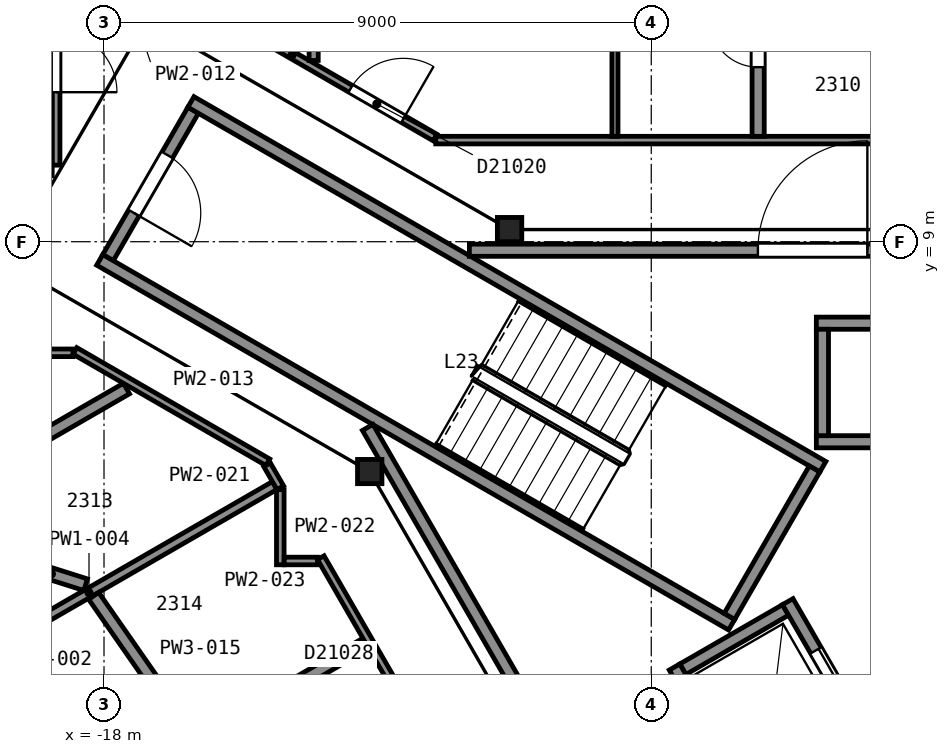
"""IFC4 building model, lengths in metres.
Left out: names, types, materials, properties, quantities, classifications, styles, units other than length and angle.
Written with IfcOpenShell. Run it as: python <this file> out.ifc"""

import sys

from ifc_helpers import new_model, si_unit, direction, frame, frame_2d, origin, origin_2d, place, context, subcontext, project, spatial, rectangle, i_section, extrude, element, fill, save


model = new_model("IFC4")
c1 = context("Model", 3, precision=1e-05, world=origin(), true_north=direction((0.0, 1.0)))
c2 = subcontext(c1, "Body", "Model", "MODEL_VIEW")
j1 = project(units=[si_unit("LENGTHUNIT", "METRE"), si_unit("PLANEANGLEUNIT", "RADIAN")], contexts=[c1])
p1 = place(None, origin())
s1 = spatial("IfcSite", under=j1, at=p1, CompositionType="ELEMENT")
p2 = place(p1, origin())
s2 = spatial("IfcBuilding", under=s1, at=p2, CompositionType="ELEMENT")
p3 = place(p2, frame((0.0, 0.0, 100.0)))
s3 = spatial("IfcBuildingStorey", under=s2, at=p3, CompositionType="ELEMENT", Elevation=100.0)
for number, where, z_axis, x_axis in (
    (1, (-11.33, 9.2, 0.0), (0.0, 0.0, 1.0), (1.0, 0.0, 0.0)),
    (2, (-13.63, 5.22, 0.0), (0.0, 0.0, 1.0), (1.0, 0.0, 0.0)),
):
    element("IfcColumn", number, at=place(p3, frame(where, z_axis=z_axis, x_axis=x_axis)), inside=s3, PredefinedType="COLUMN", context=c2, shape_type="SweptSolid", body=[
        extrude(i_section(OverallWidth=0.401, OverallDepth=0.399, WebThickness=0.025, FlangeThickness=0.04, FilletRadius=0.015, at=origin_2d()), origin(), (0.0, 0.0, 1.0), 3.6),
    ])
p4 = place(p3, frame((-16.534, 11.162, 0.0), z_axis=(0.0, 0.0, 1.0), x_axis=(-0.49998411664, -0.866034573852, 0.0)))
e3 = element("IfcWall", 3, at=p4, inside=s3, PredefinedType="PARTITIONING", context=c2, shape_type="SweptSolid", body=[
    extrude(rectangle(XDim=2.8, YDim=0.2, at=frame_2d((1.4, 0.0))), origin(), (0.0, 0.0, 1.0), 3.35),
])
p5 = place(p4, frame((0.85, 0.0, 0.0)))
e4 = element("IfcOpeningElement", 4, at=p5, cuts=e3, PredefinedType="OPENING", context=c2, shape_type="SweptSolid", body=[
    extrude(rectangle(XDim=1.1, YDim=2.1, at=frame_2d((0.55, 1.05))), frame((0.0, 0.11, 0.0), z_axis=(0.0, -1.0, 0.0), x_axis=(1.0, 0.0, 0.0)), (0.0, 0.0, 1.0), 0.22),
])
for number, where, z_axis, x_axis in (
    (5, (-7.678, 2.701, 0.0), (0.0, 0.0, 1.0), (-0.866, 0.5, 0.0)),
    (6, (-6.178, 5.299, 0.0), (0.0, 0.0, 1.0), (-0.866, 0.5, 0.0)),
):
    element("IfcWall", number, at=place(p3, frame(where, z_axis=z_axis, x_axis=x_axis)), inside=s3, PredefinedType="PARTITIONING", context=c2, shape_type="SweptSolid", body=[
        extrude(rectangle(XDim=12.0, YDim=0.2, at=frame_2d((6.0, 0.0))), origin(), (0.0, 0.0, 1.0), 3.35),
    ])
p6 = place(p3, frame((-6.315, 5.262, 0.0), z_axis=(0.0, 0.0, 1.0), x_axis=(-0.500049511043, -0.865996816683, 0.0)))
e7 = element("IfcWall", 7, at=p6, inside=s3, PredefinedType="PARTITIONING", context=c2, shape_type="SweptSolid", body=[
    extrude(rectangle(XDim=2.8, YDim=0.2, at=frame_2d((1.4, 0.0))), origin(), (0.0, 0.0, 1.0), 3.35),
])
for number, where, z_axis, x_axis in (
    (8, (-6.285, 5.71, 0.0), (0.0, 0.0, 1.0), (1.0, 0.0, 0.0)),
    (9, (-6.285, 7.66, 0.0), (0.0, 0.0, 1.0), (1.0, 0.0, 0.0)),
):
    element("IfcWall", number, at=place(p3, frame(where, z_axis=z_axis, x_axis=x_axis)), inside=s3, PredefinedType="PARTITIONING", context=c2, shape_type="SweptSolid", body=[
        extrude(rectangle(XDim=2.35, YDim=0.2, at=frame_2d((1.175, 0.0))), origin(), (0.0, 0.0, 1.0), 3.6),
    ])
p7 = place(p3, frame((-8.48, 1.969, 0.0), z_axis=(0.0, 0.0, 1.0), x_axis=(0.866000020948, 0.500043961785, 0.0)))
e10 = element("IfcWall", 10, at=p7, inside=s3, PredefinedType="PARTITIONING", context=c2, shape_type="SweptSolid", body=[
    extrude(rectangle(XDim=1.95, YDim=0.2, at=frame_2d((0.975, 0.0))), origin(), (0.0, 0.0, 1.0), 3.6),
])
p8 = place(p3, frame((-6.185, 5.81, 0.0), z_axis=(0.0, 0.0, 1.0), x_axis=(0.0, 1.0, 0.0)))
e11 = element("IfcWall", 11, at=p8, inside=s3, PredefinedType="PARTITIONING", context=c2, shape_type="SweptSolid", body=[
    extrude(rectangle(XDim=1.75, YDim=0.2, at=frame_2d((0.875, 0.0))), origin(), (0.0, 0.0, 1.0), 3.6),
])
p9 = place(p3, frame((-5.28, 0.525, 0.0), z_axis=(0.0, 0.0, 1.0), x_axis=(-0.500037662692, 0.866003658127, 0.0)))
e12 = element("IfcWall", 12, at=p9, inside=s3, PredefinedType="PARTITIONING", context=c2, shape_type="SweptSolid", body=[
    extrude(rectangle(XDim=2.95, YDim=0.2, at=frame_2d((1.475, 0.0))), origin(), (0.0, 0.0, 1.0), 3.6),
])
p10 = place(p9, frame((0.925, 0.0, 0.0)))
e13 = element("IfcOpeningElement", 13, at=p10, cuts=e12, PredefinedType="OPENING", context=c2, shape_type="SweptSolid", body=[
    extrude(rectangle(XDim=1.1, YDim=2.1, at=frame_2d((0.55, 1.05))), frame((0.0, 0.11, 0.0), z_axis=(0.0, -1.0, 0.0), x_axis=(1.0, 0.0, 0.0)), (0.0, 0.0, 1.0), 0.22),
])
p11 = place(p3, frame((-7.242, -0.376, 0.0), z_axis=(0.0, 0.0, 1.0), x_axis=(-0.499996545922, 0.866027397988, 0.0)))
e14 = element("IfcWall", 14, at=p11, inside=s3, PredefinedType="PARTITIONING", context=c2, shape_type="SweptSolid", body=[
    extrude(rectangle(XDim=2.75, YDim=0.2, at=frame_2d((1.375, 0.0))), origin(), (0.0, 0.0, 1.0), 3.6),
])
p12 = place(p3, frame((-13.664, 5.946, 0.0), z_axis=(0.0, 0.0, 1.0), x_axis=(0.499994327219, -0.866028678941, 0.0)))
e15 = element("IfcWall", 15, at=p12, inside=s3, PredefinedType="PARTITIONING", context=c2, shape_type="SweptSolid", body=[
    extrude(rectangle(XDim=23.968, YDim=0.2, at=frame_2d((11.984, 0.0))), origin(), (0.0, 0.0, 1.0), 3.35),
])
p13 = place(p3, frame((0.263, 8.86, 0.0), z_axis=(0.0, 0.0, 1.0), x_axis=(-1.0, 0.0, 0.0)))
e16 = element("IfcWall", 16, at=p13, inside=s3, PredefinedType="PARTITIONING", context=c2, shape_type="SweptSolid", body=[
    extrude(rectangle(XDim=12.254, YDim=0.2, at=frame_2d((6.127, 0.0))), origin(), (0.0, 0.0, 1.0), 3.35),
])
p14 = place(p13, frame((5.709, 0.0, 0.0)))
e17 = element("IfcOpeningElement", 17, at=p14, cuts=e16, PredefinedType="OPENING", context=c2, shape_type="SweptSolid", body=[
    extrude(rectangle(XDim=1.8, YDim=2.1, at=frame_2d((0.9, 1.05))), frame((0.0, 0.11, 0.0), z_axis=(0.0, -1.0, 0.0), x_axis=(1.0, 0.0, 0.0)), (0.0, 0.0, 1.0), 0.22),
])
p15 = place(p3, frame((-21.263, 4.296, 0.0), z_axis=(0.0, 0.0, 1.0), x_axis=(0.95341383314, -0.301665481582, 0.0)))
e18 = element("IfcWall", 18, at=p15, inside=s3, PredefinedType="PARTITIONING", context=c2, shape_type="SweptSolid", body=[
    extrude(rectangle(XDim=3.106, YDim=0.2, at=frame_2d((1.553, 0.0))), origin(), (0.0, 0.0, 1.0), 2.613),
])
p16 = place(p15, frame((1.125, 0.0, 0.0)))
e19 = element("IfcOpeningElement", 19, at=p16, cuts=e18, PredefinedType="OPENING", context=c2, shape_type="SweptSolid", body=[
    extrude(rectangle(XDim=0.8, YDim=2.1, at=frame_2d((0.4, 1.05))), frame((0.0, 0.11, 0.0), z_axis=(0.0, -1.0, 0.0), x_axis=(1.0, 0.0, 0.0)), (0.0, 0.0, 1.0), 0.22),
])
p17 = place(p3, frame((-21.565, 4.314, 0.0), z_axis=(0.0, 0.0, 1.0), x_axis=(0.866058501026, 0.499942669514, 0.0)))
e20 = element("IfcWall", 20, at=p17, inside=s3, PredefinedType="PARTITIONING", context=c2, shape_type="SweptSolid", body=[
    extrude(rectangle(XDim=4.542, YDim=0.2, at=frame_2d((2.271, 0.0))), origin(), (0.0, 0.0, 1.0), 2.613),
])
p18 = place(p3, frame((-21.301, 1.464, 0.0), z_axis=(0.0, 0.0, 1.0), x_axis=(0.866055299146, 0.49994821614, 0.0)))
e21 = element("IfcWall", 21, at=p18, inside=s3, PredefinedType="PARTITIONING", context=c2, shape_type="SweptSolid", body=[
    extrude(rectangle(XDim=7.052, YDim=0.15, at=frame_2d((3.526, 0.0))), origin(), (0.0, 0.0, 1.0), 2.613),
])
p19 = place(p3, frame((-21.022, 7.173, 0.0), z_axis=(0.0, 0.0, 1.0), x_axis=(1.0, 0.0, 0.0)))
e22 = element("IfcWall", 22, at=p19, inside=s3, PredefinedType="PARTITIONING", context=c2, shape_type="SweptSolid", body=[
    extrude(rectangle(XDim=2.513, YDim=0.125, at=frame_2d((1.256, 0.0))), origin(), (0.0, 0.0, 1.0), 2.613),
])
p20 = place(p3, frame((-18.787, 10.259, 0.0), z_axis=(0.0, 0.0, 1.0), x_axis=(0.0, 1.0, 0.0)))
e23 = element("IfcWall", 23, at=p20, inside=s3, PredefinedType="PARTITIONING", context=c2, shape_type="SweptSolid", body=[
    extrude(rectangle(XDim=3.93, YDim=0.125, at=frame_2d((1.965, 0.0))), origin(), (0.0, 0.0, 1.0), 2.613),
])
p21 = place(p20, frame((1.2, 0.0, 0.0)))
e24 = element("IfcOpeningElement", 24, at=p21, cuts=e23, PredefinedType="OPENING", context=c2, shape_type="SweptSolid", body=[
    extrude(rectangle(XDim=1.0, YDim=2.1, at=frame_2d((0.5, 1.05))), frame((0.0, 0.073, 0.0), z_axis=(0.0, -1.0, 0.0), x_axis=(1.0, 0.0, 0.0)), (0.0, 0.0, 1.0), 0.145),
])
p22 = place(p3, frame((-18.478, 7.204, 0.0), z_axis=(0.0, 0.0, 1.0), x_axis=(0.866011320536, -0.500024392108, 0.0)))
e25 = element("IfcWall", 25, at=p22, inside=s3, PredefinedType="PARTITIONING", context=c2, shape_type="SweptSolid", body=[
    extrude(rectangle(XDim=3.663, YDim=0.125, at=frame_2d((1.832, 0.0))), origin(), (0.0, 0.0, 1.0), 2.613),
])
p23 = place(p3, frame((-18.17, 3.175, 0.0), z_axis=(0.0, 0.0, 1.0), x_axis=(0.571541682724, -0.820573034476, 0.0)))
e26 = element("IfcWall", 26, at=p23, inside=s3, PredefinedType="PARTITIONING", context=c2, shape_type="SweptSolid", body=[
    extrude(rectangle(XDim=2.818, YDim=0.2, at=frame_2d((1.409, 0.0))), origin(), (0.0, 0.0, 1.0), 2.613),
])
p24 = place(p3, frame((-16.583, 0.723, 0.0), z_axis=(0.0, 0.0, 1.0), x_axis=(0.866001642064, 0.500041154249, 0.0)))
e27 = element("IfcWall", 27, at=p24, inside=s3, PredefinedType="PARTITIONING", context=c2, shape_type="SweptSolid", body=[
    extrude(rectangle(XDim=3.338, YDim=0.2, at=frame_2d((1.669, 0.0))), origin(), (0.0, 0.0, 1.0), 2.613),
])
p25 = place(p24, frame((1.3, 0.0, 0.0)))
e28 = element("IfcOpeningElement", 28, at=p25, cuts=e27, PredefinedType="OPENING", context=c2, shape_type="SweptSolid", body=[
    extrude(rectangle(XDim=0.9, YDim=2.1, at=frame_2d((0.45, 1.05))), frame((0.0, 0.11, 0.0), z_axis=(0.0, -1.0, 0.0), x_axis=(1.0, 0.0, 0.0)), (0.0, 0.0, 1.0), 0.22),
])
p26 = place(p3, frame((-15.867, 12.625, 0.0), z_axis=(0.0, 0.0, 1.0), x_axis=(0.86603035395, -0.499991425964, 0.0)))
e29 = element("IfcWall", 29, at=p26, inside=s3, PredefinedType="PARTITIONING", context=c2, shape_type="SweptSolid", body=[
    extrude(rectangle(XDim=3.824, YDim=0.125, at=frame_2d((1.912, 0.0))), origin(), (0.0, 0.0, 1.0), 2.613),
])
p27 = place(p26, frame((2.219, 0.0, 0.0)))
e30 = element("IfcOpeningElement", 30, at=p27, cuts=e29, PredefinedType="OPENING", context=c2, shape_type="SweptSolid", body=[
    extrude(rectangle(XDim=1.0, YDim=2.1, at=frame_2d((0.5, 1.05))), frame((0.0, 0.073, 0.0), z_axis=(0.0, -1.0, 0.0), x_axis=(1.0, 0.0, 0.0)), (0.0, 0.0, 1.0), 0.145),
])
p28 = place(p3, frame((-15.318, 5.33, 0.0), z_axis=(0.0, 0.0, 1.0), x_axis=(0.499836277606, -0.86611990832, 0.0)))
e31 = element("IfcWall", 31, at=p28, inside=s3, PredefinedType="PARTITIONING", context=c2, shape_type="SweptSolid", body=[
    extrude(rectangle(XDim=0.433, YDim=0.125, at=frame_2d((0.217, 0.0))), origin(), (0.0, 0.0, 1.0), 2.613),
])
p29 = place(p3, frame((-15.101, 3.687, 0.0), z_axis=(0.0, 0.0, 1.0), x_axis=(0.0, 1.0, 0.0)))
e32 = element("IfcWall", 32, at=p29, inside=s3, PredefinedType="PARTITIONING", context=c2, shape_type="SweptSolid", body=[
    extrude(rectangle(XDim=1.236, YDim=0.125, at=frame_2d((0.618, 0.0))), origin(), (0.0, 0.0, 1.0), 2.613),
])
p30 = place(p3, frame((-15.036, 3.749, 0.0), z_axis=(0.0, 0.0, 1.0), x_axis=(1.0, 0.0, 0.0)))
e33 = element("IfcWall", 33, at=p30, inside=s3, PredefinedType="PARTITIONING", context=c2, shape_type="SweptSolid", body=[
    extrude(rectangle(XDim=0.547, YDim=0.125, at=frame_2d((0.273, 0.0))), origin(), (0.0, 0.0, 1.0), 2.613),
])
p31 = place(p3, frame((-14.552, 11.981, 0.0), z_axis=(0.0, 0.0, 1.0), x_axis=(0.0, 1.0, 0.0)))
e34 = element("IfcWall", 34, at=p31, inside=s3, PredefinedType="PARTITIONING", context=c2, shape_type="SweptSolid", body=[
    extrude(rectangle(XDim=5.734, YDim=0.15, at=frame_2d((2.867, 0.0))), origin(), (0.0, 0.0, 1.0), 2.613),
])
p32 = place(p3, frame((-9.41, -4.902, 0.0), z_axis=(0.0, 0.0, 1.0), x_axis=(-0.499971244726, 0.866042005013, 0.0)))
e35 = element("IfcWall", 35, at=p32, inside=s3, PredefinedType="PARTITIONING", context=c2, shape_type="SweptSolid", body=[
    extrude(rectangle(XDim=10.052, YDim=0.125, at=frame_2d((5.026, 0.0))), origin(), (0.0, 0.0, 1.0), 2.613),
])
p33 = place(p32, frame((6.608, 0.0, 0.0)))
e36 = element("IfcOpeningElement", 36, at=p33, cuts=e35, PredefinedType="OPENING", context=c2, shape_type="SweptSolid", body=[
    extrude(rectangle(XDim=1.0, YDim=2.1, at=frame_2d((0.5, 1.05))), frame((0.0, 0.073, 0.0), z_axis=(0.0, -1.0, 0.0), x_axis=(1.0, 0.0, 0.0)), (0.0, 0.0, 1.0), 0.145),
])
p34 = place(p32, frame((2.989, 0.0, 0.0)))
e37 = element("IfcOpeningElement", 37, at=p34, cuts=e35, PredefinedType="OPENING", context=c2, shape_type="SweptSolid", body=[
    extrude(rectangle(XDim=1.0, YDim=2.1, at=frame_2d((0.5, 1.05))), frame((0.0, 0.073, 0.0), z_axis=(0.0, -1.0, 0.0), x_axis=(1.0, 0.0, 0.0)), (0.0, 0.0, 1.0), 0.145),
])
p35 = place(p3, frame((-12.544, 10.671, 0.0), z_axis=(0.0, 0.0, 1.0), x_axis=(1.0, 0.0, 0.0)))
e38 = element("IfcWall", 38, at=p35, inside=s3, PredefinedType="PARTITIONING", context=c2, shape_type="SweptSolid", body=[
    extrude(rectangle(XDim=25.089, YDim=0.125, at=frame_2d((12.544, 0.0))), origin(), (0.0, 0.0, 1.0), 2.613),
])
p36 = place(p35, frame((18.962, 0.0, 0.0)))
e39 = element("IfcOpeningElement", 39, at=p36, cuts=e38, PredefinedType="OPENING", context=c2, shape_type="SweptSolid", body=[
    extrude(rectangle(XDim=0.9, YDim=2.1, at=frame_2d((0.45, 1.05))), frame((0.0, 0.073, 0.0), z_axis=(0.0, -1.0, 0.0), x_axis=(1.0, 0.0, 0.0)), (0.0, 0.0, 1.0), 0.145),
])
p37 = place(p35, frame((14.857, 0.0, 0.0)))
e40 = element("IfcOpeningElement", 40, at=p37, cuts=e38, PredefinedType="OPENING", context=c2, shape_type="SweptSolid", body=[
    extrude(rectangle(XDim=1.0, YDim=2.1, at=frame_2d((0.5, 1.05))), frame((0.0, 0.073, 0.0), z_axis=(0.0, -1.0, 0.0), x_axis=(1.0, 0.0, 0.0)), (0.0, 0.0, 1.0), 0.145),
])
p38 = place(p3, frame((-9.597, 17.715, 0.0), z_axis=(0.0, 0.0, 1.0), x_axis=(0.0, -1.0, 0.0)))
e41 = element("IfcWall", 41, at=p38, inside=s3, PredefinedType="PARTITIONING", context=c2, shape_type="SweptSolid", body=[
    extrude(rectangle(XDim=6.982, YDim=0.1, at=frame_2d((3.491, 0.0))), origin(), (0.0, 0.0, 1.0), 2.613),
])
p39 = place(p38, frame((3.094, 0.0, 0.0)))
e42 = element("IfcOpeningElement", 42, at=p39, cuts=e41, PredefinedType="OPENING", context=c2, shape_type="SweptSolid", body=[
    extrude(rectangle(XDim=0.9, YDim=2.1, at=frame_2d((0.45, 1.05))), frame((0.0, 0.06, 0.0), z_axis=(0.0, -1.0, 0.0), x_axis=(1.0, 0.0, 0.0)), (0.0, 0.0, 1.0), 0.12),
])
p40 = place(p3, frame((-7.242, 13.971, 0.0), z_axis=(0.0, 0.0, 1.0), x_axis=(0.0, -1.0, 0.0)))
e43 = element("IfcWall", 43, at=p40, inside=s3, PredefinedType="PARTITIONING", context=c2, shape_type="SweptSolid", body=[
    extrude(rectangle(XDim=3.238, YDim=0.2, at=frame_2d((1.619, 0.0))), origin(), (0.0, 0.0, 1.0), 2.613),
])
p41 = place(p40, frame((1.3, 0.0, 0.0)))
e44 = element("IfcOpeningElement", 44, at=p41, cuts=e43, PredefinedType="OPENING", context=c2, shape_type="SweptSolid", body=[
    extrude(rectangle(XDim=0.8, YDim=2.1, at=frame_2d((0.4, 1.05))), frame((0.0, 0.11, 0.0), z_axis=(0.0, -1.0, 0.0), x_axis=(1.0, 0.0, 0.0)), (0.0, 0.0, 1.0), 0.22),
])
p42 = place(p5, origin())
e45 = element("IfcDoor", 45, at=p42, inside=s3, OperationType="SINGLE_SWING_RIGHT", PredefinedType="DOOR", context=c2, shape_type="SweptSolid", body=[
    extrude(rectangle(XDim=1.1, YDim=2.1, at=frame_2d((0.55, 1.05))), frame((0.0, 0.025, 0.0), z_axis=(0.0, -1.0, 0.0), x_axis=(1.0, 0.0, 0.0)), (0.0, 0.0, 1.0), 0.05),
])
fill(e4, e45)
p43 = place(p10, origin())
e46 = element("IfcDoor", 46, at=p43, inside=s3, OperationType="SLIDING_TO_LEFT", PredefinedType="DOOR", context=c2, shape_type="SweptSolid", body=[
    extrude(rectangle(XDim=1.1, YDim=2.1, at=frame_2d((0.55, 1.05))), frame((0.0, 0.025, 0.0), z_axis=(0.0, -1.0, 0.0), x_axis=(1.0, 0.0, 0.0)), (0.0, 0.0, 1.0), 0.05),
])
fill(e13, e46)
p44 = place(p14, origin())
e47 = element("IfcDoor", 47, at=p44, inside=s3, OperationType="DOUBLE_DOOR_SINGLE_SWING", PredefinedType="DOOR", context=c2, shape_type="SweptSolid", body=[
    extrude(rectangle(XDim=1.8, YDim=2.1, at=frame_2d((0.9, 1.05))), frame((0.0, 0.025, 0.0), z_axis=(0.0, -1.0, 0.0), x_axis=(1.0, 0.0, 0.0)), (0.0, 0.0, 1.0), 0.05),
])
fill(e17, e47)
p45 = place(p21, origin())
e48 = element("IfcDoor", 48, at=p45, inside=s3, OperationType="SINGLE_SWING_LEFT", PredefinedType="DOOR", context=c2, shape_type="SweptSolid", body=[
    extrude(rectangle(XDim=1.0, YDim=2.1, at=frame_2d((0.5, 1.05))), frame((0.0, 0.025, 0.0), z_axis=(0.0, -1.0, 0.0), x_axis=(1.0, 0.0, 0.0)), (0.0, 0.0, 1.0), 0.05),
])
fill(e24, e48)
p46 = place(p27, origin())
e49 = element("IfcDoor", 49, at=p46, inside=s3, OperationType="SINGLE_SWING_RIGHT", PredefinedType="DOOR", context=c2, shape_type="SweptSolid", body=[
    extrude(rectangle(XDim=1.0, YDim=2.1, at=frame_2d((0.5, 1.05))), frame((0.0, 0.025, 0.0), z_axis=(0.0, -1.0, 0.0), x_axis=(1.0, 0.0, 0.0)), (0.0, 0.0, 1.0), 0.05),
])
fill(e30, e49)
p47 = place(p41, origin())
e50 = element("IfcDoor", 50, at=p47, inside=s3, OperationType="SINGLE_SWING_LEFT", PredefinedType="DOOR", context=c2, shape_type="SweptSolid", body=[
    extrude(rectangle(XDim=0.8, YDim=2.1, at=frame_2d((0.4, 1.05))), frame((0.0, 0.025, 0.0), z_axis=(0.0, -1.0, 0.0), x_axis=(1.0, 0.0, 0.0)), (0.0, 0.0, 1.0), 0.05),
])
fill(e44, e50)
save(model, sys.argv[1])
